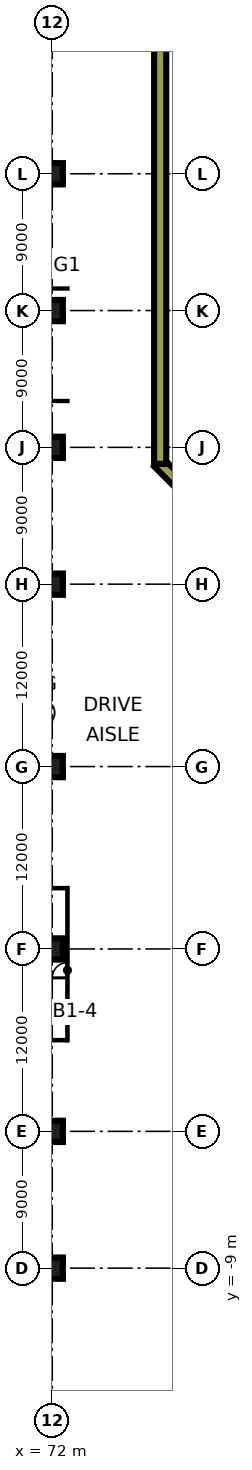
"""IFC4 building model, lengths in metres.
Left out: names, types, materials, properties, quantities, classifications, styles, units other than length and angle.
Written with IfcOpenShell. Run it as: python <this file> out.ifc"""

import sys

from ifc_helpers import new_model, si_unit, direction, frame, frame_2d, origin, origin_2d, place, context, subcontext, project, spatial, rectangle, extrude, element, fill, save


model = new_model("IFC4")
c1 = context("Model", 3, precision=1e-05, world=origin(), true_north=direction((0.0, 1.0)))
c2 = subcontext(c1, "Body", "Model", "MODEL_VIEW")
j1 = project(units=[si_unit("LENGTHUNIT", "METRE"), si_unit("PLANEANGLEUNIT", "RADIAN")], contexts=[c1])
p1 = place(None, origin())
s1 = spatial("IfcSite", under=j1, at=p1, CompositionType="ELEMENT")
p2 = place(p1, origin())
s2 = spatial("IfcBuilding", under=s1, at=p2, CompositionType="ELEMENT")
p3 = place(p2, frame((0.0, 0.0, -4.5)))
s3 = spatial("IfcBuildingStorey", under=s2, at=p3, CompositionType="ELEMENT", Elevation=-4.5)
for number, where, z_axis, x_axis in (
    (1, (72.0, -9.0, 0.0), (0.0, 0.0, 1.0), (1.0, 0.0, 0.0)),
    (2, (72.0, 0.0, 0.0), (0.0, 0.0, 1.0), (1.0, 0.0, 0.0)),
    (3, (72.0, 12.0, 0.0), (0.0, 0.0, 1.0), (1.0, 0.0, 0.0)),
    (4, (72.0, 24.0, 0.0), (0.0, 0.0, 1.0), (1.0, 0.0, 0.0)),
    (5, (72.0, 36.0, 0.0), (0.0, 0.0, 1.0), (1.0, 0.0, 0.0)),
    (6, (72.0, 45.0, 0.0), (0.0, 0.0, 1.0), (1.0, 0.0, 0.0)),
    (7, (72.0, 54.0, 0.0), (0.0, 0.0, 1.0), (1.0, 0.0, 0.0)),
    (8, (72.0, 63.0, 0.0), (0.0, 0.0, 1.0), (1.0, 0.0, 0.0)),
):
    element("IfcColumn", number, at=place(p3, frame(where, z_axis=z_axis, x_axis=x_axis)), inside=s3, PredefinedType="COLUMN", context=c2, shape_type="SweptSolid", body=[
        extrude(rectangle(XDim=1.4, YDim=1.4, at=origin_2d()), origin(), (0.0, 0.0, 1.0), 4.5),
    ])
p4 = place(p3, frame((78.294, -20.717, 0.0), z_axis=(0.0, 0.0, 1.0), x_axis=(0.707112814855, 0.707100747466, 0.0)))
e9 = element("IfcWall", 9, at=p4, inside=s3, PredefinedType="SOLIDWALL", context=c2, shape_type="SweptSolid", body=[
    extrude(rectangle(XDim=20.231, YDim=0.8, at=frame_2d((10.116, 0.0))), origin(), (0.0, 0.0, 1.0), 4.5),
])
p5 = place(p3, frame((92.717, 30.294, 0.0), z_axis=(0.0, 0.0, 1.0), x_axis=(-0.707106781187, 0.707106781187, 0.0)))
e10 = element("IfcWall", 10, at=p5, inside=s3, PredefinedType="SOLIDWALL", context=c2, shape_type="SweptSolid", body=[
    extrude(rectangle(XDim=19.423, YDim=0.8, at=frame_2d((9.712, 0.0))), origin(), (0.0, 0.0, 1.0), 4.5),
])
p6 = place(p3, frame((79.1, 43.912, 0.0), z_axis=(0.0, 0.0, 1.0), x_axis=(0.0, 1.0, 0.0)))
e11 = element("IfcWall", 11, at=p6, inside=s3, PredefinedType="SOLIDWALL", context=c2, shape_type="SweptSolid", body=[
    extrude(rectangle(XDim=35.188, YDim=0.8, at=frame_2d((17.594, 0.0))), origin(), (0.0, 0.0, 1.0), 4.5),
])
for number, where, z_axis, x_axis in (
    (12, (66.05, 6.0, 0.0), (0.0, 0.0, 1.0), (1.0, 0.0, 0.0)),
    (13, (66.05, 16.0, 0.0), (0.0, 0.0, 1.0), (1.0, 0.0, 0.0)),
):
    element("IfcWall", number, at=place(p3, frame(where, z_axis=z_axis, x_axis=x_axis)), inside=s3, PredefinedType="PARTITIONING", context=c2, shape_type="SweptSolid", body=[
        extrude(rectangle(XDim=6.9, YDim=0.1, at=frame_2d((3.45, 0.0))), origin(), (0.0, 0.0, 1.0), 4.05),
    ])
p7 = place(p3, frame((73.0, 5.95, 0.0), z_axis=(0.0, 0.0, 1.0), x_axis=(0.0, 1.0, 0.0)))
e14 = element("IfcWall", 14, at=p7, inside=s3, PredefinedType="PARTITIONING", context=c2, shape_type="SweptSolid", body=[
    extrude(rectangle(XDim=10.1, YDim=0.1, at=frame_2d((5.05, 0.0))), origin(), (0.0, 0.0, 1.0), 4.05),
])
p8 = place(p7, frame((4.15, 0.0, 0.0)))
e15 = element("IfcOpeningElement", 15, at=p8, cuts=e14, PredefinedType="OPENING", context=c2, shape_type="SweptSolid", body=[
    extrude(rectangle(XDim=1.0, YDim=2.1, at=frame_2d((0.5, 1.05))), frame((0.0, 0.06, 0.0), z_axis=(0.0, -1.0, 0.0), x_axis=(1.0, 0.0, 0.0)), (0.0, 0.0, 1.0), 0.12),
])
p9 = place(p8, origin())
e16 = element("IfcDoor", 16, at=p9, inside=s3, OperationType="SINGLE_SWING_LEFT", PredefinedType="DOOR", context=c2, shape_type="SweptSolid", body=[
    extrude(rectangle(XDim=1.0, YDim=2.1, at=frame_2d((0.5, 1.05))), frame((0.0, 0.025, 0.0), z_axis=(0.0, -1.0, 0.0), x_axis=(1.0, 0.0, 0.0)), (0.0, 0.0, 1.0), 0.05),
])
fill(e15, e16)
save(model, sys.argv[1])
